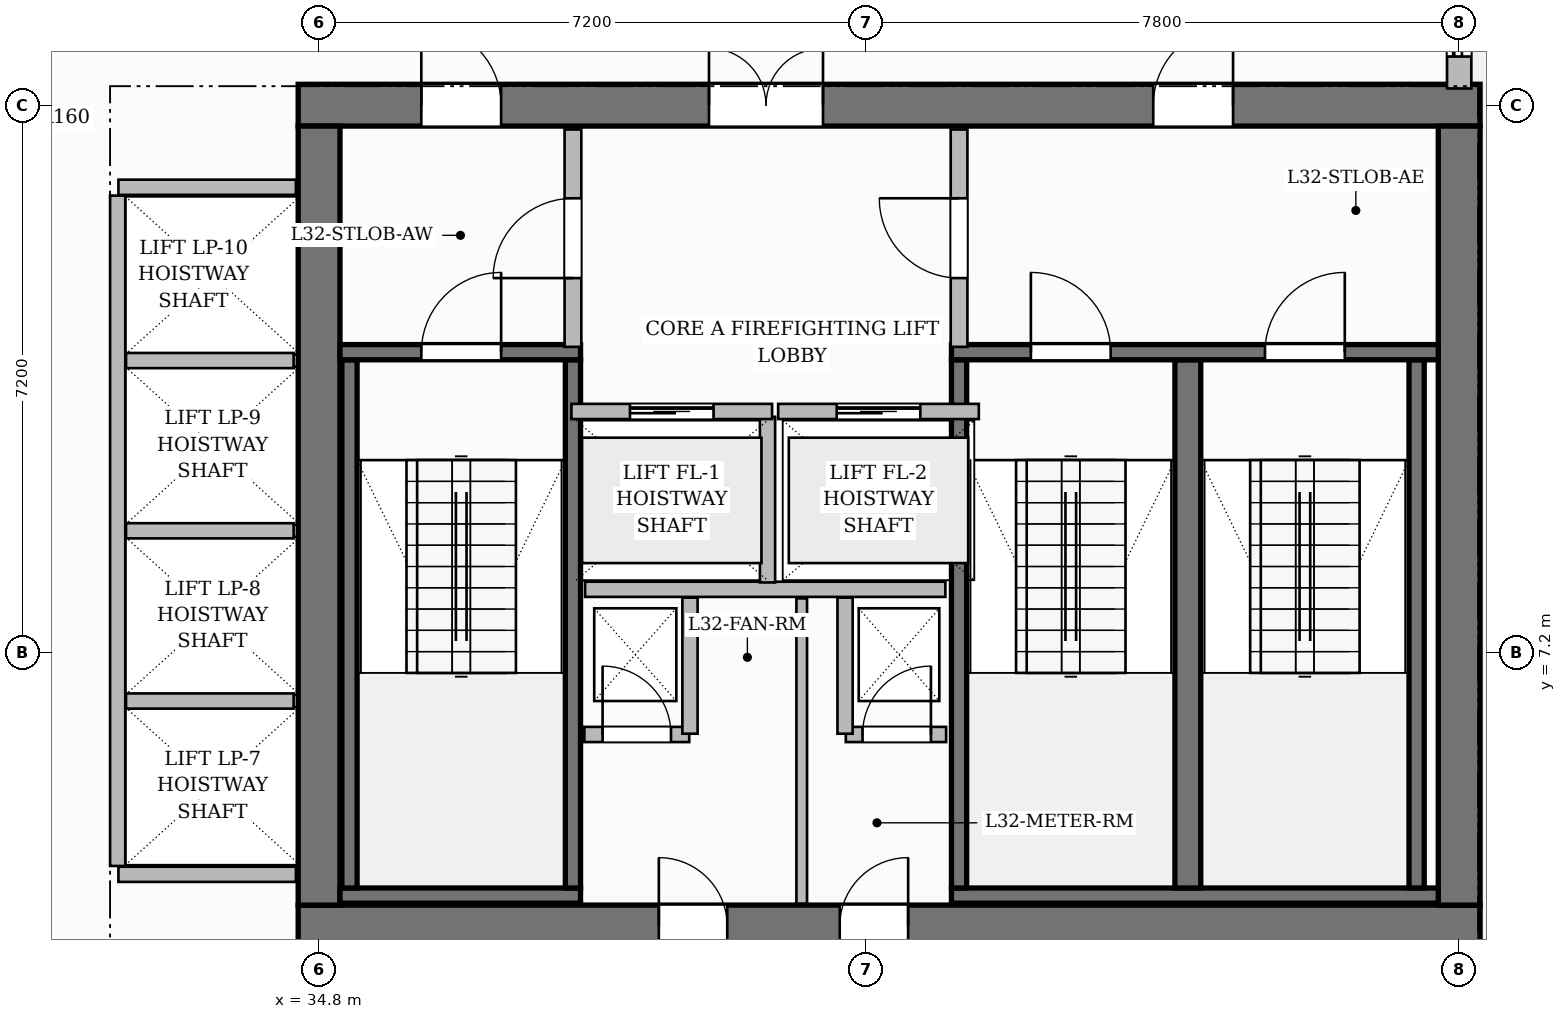
"""IFC4 building model, lengths in metres.
Left out: names, types, materials, properties, quantities, classifications, styles, units other than length and angle.
Written with IfcOpenShell. Run it as: python <this file> out.ifc"""

import sys

from ifc_helpers import new_model, si_unit, direction, frame, frame_2d, origin, place, context, subcontext, project, spatial, rectangle, extrude, source, transform, mapped, element, fill, save


model = new_model("IFC4")
c1 = context("Model", 3, precision=1e-05, world=origin(), true_north=direction((0.0, 1.0)))
c2 = subcontext(c1, "Body", "Model", "MODEL_VIEW")
j1 = project(units=[si_unit("LENGTHUNIT", "METRE"), si_unit("PLANEANGLEUNIT", "RADIAN")], contexts=[c1])
p1 = place(None, origin())
s1 = spatial("IfcSite", under=j1, at=p1, CompositionType="ELEMENT")
p2 = place(p1, origin())
s2 = spatial("IfcBuilding", under=s1, at=p2, CompositionType="ELEMENT")
p3 = place(p2, frame((0.0, 0.0, 130.3)))
s3 = spatial("IfcBuildingStorey", under=s2, at=p3, CompositionType="ELEMENT", Elevation=130.3)
p4 = place(p3, frame((34.525, 3.6, 0.0), z_axis=(0.0, 0.0, 1.0), x_axis=(1.0, 0.0, 0.0)))
e1 = element("IfcWall", 1, at=p4, inside=s3, PredefinedType="SHEAR", context=c2, shape_type="SweptSolid", body=[
    extrude(rectangle(XDim=15.55, YDim=0.55, at=frame_2d((7.775, 0.0))), origin(), (0.0, 0.0, 1.0), 3.7),
])
p5 = place(p4, frame((4.745, 0.0, 0.0)))
e2 = element("IfcOpeningElement", 2, at=p5, cuts=e1, PredefinedType="OPENING", context=c2, shape_type="SweptSolid", body=[
    extrude(rectangle(XDim=0.9, YDim=2.1, at=frame_2d((0.45, 1.05))), frame((0.0, 0.285, 0.0), z_axis=(0.0, -1.0, 0.0), x_axis=(1.0, 0.0, 0.0)), (0.0, 0.0, 1.0), 0.57),
])
p6 = place(p4, frame((7.125, 0.0, 0.0)))
e3 = element("IfcOpeningElement", 3, at=p6, cuts=e1, PredefinedType="OPENING", context=c2, shape_type="SweptSolid", body=[
    extrude(rectangle(XDim=0.9, YDim=2.1, at=frame_2d((0.45, 1.05))), frame((0.0, 0.285, 0.0), z_axis=(0.0, -1.0, 0.0), x_axis=(1.0, 0.0, 0.0)), (0.0, 0.0, 1.0), 0.57),
])
p7 = place(p3, frame((34.525, 14.4, 0.0), z_axis=(0.0, 0.0, 1.0), x_axis=(1.0, 0.0, 0.0)))
e4 = element("IfcWall", 4, at=p7, inside=s3, PredefinedType="SHEAR", context=c2, shape_type="SweptSolid", body=[
    extrude(rectangle(XDim=15.55, YDim=0.55, at=frame_2d((7.775, 0.0))), origin(), (0.0, 0.0, 1.0), 3.7),
])
p8 = place(p7, frame((5.405, 0.0, 0.0)))
e5 = element("IfcOpeningElement", 5, at=p8, cuts=e4, PredefinedType="OPENING", context=c2, shape_type="SweptSolid", body=[
    extrude(rectangle(XDim=1.5, YDim=2.2, at=frame_2d((0.75, 1.1))), frame((0.0, 0.285, 0.0), z_axis=(0.0, -1.0, 0.0), x_axis=(1.0, 0.0, 0.0)), (0.0, 0.0, 1.0), 0.57),
])
p9 = place(p7, frame((1.62, 0.0, 0.0)))
e6 = element("IfcOpeningElement", 6, at=p9, cuts=e4, PredefinedType="OPENING", context=c2, shape_type="SweptSolid", body=[
    extrude(rectangle(XDim=1.05, YDim=2.15, at=frame_2d((0.525, 1.075))), frame((0.0, 0.285, 0.0), z_axis=(0.0, -1.0, 0.0), x_axis=(1.0, 0.0, 0.0)), (0.0, 0.0, 1.0), 0.57),
])
p10 = place(p7, frame((11.25, 0.0, 0.0)))
e7 = element("IfcOpeningElement", 7, at=p10, cuts=e4, PredefinedType="OPENING", context=c2, shape_type="SweptSolid", body=[
    extrude(rectangle(XDim=1.05, YDim=2.15, at=frame_2d((0.525, 1.075))), frame((0.0, 0.285, 0.0), z_axis=(0.0, -1.0, 0.0), x_axis=(1.0, 0.0, 0.0)), (0.0, 0.0, 1.0), 0.57),
])
for number, where, z_axis, x_axis in (
    (8, (34.8, 3.875, 0.0), (0.0, 0.0, 1.0), (0.0, 1.0, 0.0)),
    (9, (49.8, 3.875, 0.0), (0.0, 0.0, 1.0), (0.0, 1.0, 0.0)),
):
    element("IfcWall", number, at=place(p3, frame(where, z_axis=z_axis, x_axis=x_axis)), inside=s3, PredefinedType="SHEAR", context=c2, shape_type="SweptSolid", body=[
        extrude(rectangle(XDim=10.25, YDim=0.55, at=frame_2d((5.125, 0.0))), origin(), (0.0, 0.0, 1.0), 3.7),
    ])
p11 = place(p3, frame((35.075, 4.0, 0.0), z_axis=(0.0, 0.0, 1.0), x_axis=(1.0, 0.0, 0.0)))
e10 = element("IfcWall", 10, at=p11, inside=s3, PredefinedType="SHEAR", context=c2, shape_type="SweptSolid", body=[
    extrude(rectangle(XDim=3.165, YDim=0.2, at=frame_2d((1.583, 0.0))), origin(), (0.0, 0.0, 1.0), 3.7),
])
for number, where, z_axis, x_axis in (
    (11, (35.2, 4.1, 0.0), (0.0, 0.0, 1.0), (0.0, 1.0, 0.0)),
    (12, (38.14, 4.1, 0.0), (0.0, 0.0, 1.0), (0.0, 1.0, 0.0)),
):
    element("IfcWall", number, at=place(p3, frame(where, z_axis=z_axis, x_axis=x_axis)), inside=s3, PredefinedType="SHEAR", context=c2, shape_type="SweptSolid", body=[
        extrude(rectangle(XDim=6.95, YDim=0.2, at=frame_2d((3.475, 0.0))), origin(), (0.0, 0.0, 1.0), 3.7),
    ])
p12 = place(p3, frame((35.075, 11.15, 0.0), z_axis=(0.0, 0.0, 1.0), x_axis=(1.0, 0.0, 0.0)))
e13 = element("IfcWall", 13, at=p12, inside=s3, PredefinedType="SHEAR", context=c2, shape_type="SweptSolid", body=[
    extrude(rectangle(XDim=3.165, YDim=0.2, at=frame_2d((1.583, 0.0))), origin(), (0.0, 0.0, 1.0), 3.7),
])
p13 = place(p12, frame((1.07, 0.0, 0.0)))
e14 = element("IfcOpeningElement", 14, at=p13, cuts=e13, PredefinedType="OPENING", context=c2, shape_type="SweptSolid", body=[
    extrude(rectangle(XDim=1.05, YDim=2.2, at=frame_2d((0.525, 1.1))), frame((0.0, 0.11, 0.0), z_axis=(0.0, -1.0, 0.0), x_axis=(1.0, 0.0, 0.0)), (0.0, 0.0, 1.0), 0.22),
])
p14 = place(p3, frame((43.12, 4.0, 0.0), z_axis=(0.0, 0.0, 1.0), x_axis=(1.0, 0.0, 0.0)))
e15 = element("IfcWall", 15, at=p14, inside=s3, PredefinedType="SHEAR", context=c2, shape_type="SweptSolid", body=[
    extrude(rectangle(XDim=6.405, YDim=0.2, at=frame_2d((3.202, 0.0))), origin(), (0.0, 0.0, 1.0), 3.7),
])
p15 = place(p3, frame((43.22, 4.1, 0.0), z_axis=(0.0, 0.0, 1.0), x_axis=(0.0, 1.0, 0.0)))
e16 = element("IfcWall", 16, at=p15, inside=s3, PredefinedType="SHEAR", context=c2, shape_type="SweptSolid", body=[
    extrude(rectangle(XDim=6.95, YDim=0.2, at=frame_2d((3.475, 0.0))), origin(), (0.0, 0.0, 1.0), 3.7),
])
p16 = place(p3, frame((46.23, 4.1, 0.0), z_axis=(0.0, 0.0, 1.0), x_axis=(0.0, 1.0, 0.0)))
e17 = element("IfcWall", 17, at=p16, inside=s3, PredefinedType="SHEAR", context=c2, shape_type="SweptSolid", body=[
    extrude(rectangle(XDim=6.95, YDim=0.34, at=frame_2d((3.475, 0.0))), origin(), (0.0, 0.0, 1.0), 3.7),
])
p17 = place(p3, frame((49.24, 4.1, 0.0), z_axis=(0.0, 0.0, 1.0), x_axis=(0.0, 1.0, 0.0)))
e18 = element("IfcWall", 18, at=p17, inside=s3, PredefinedType="SHEAR", context=c2, shape_type="SweptSolid", body=[
    extrude(rectangle(XDim=6.95, YDim=0.2, at=frame_2d((3.475, 0.0))), origin(), (0.0, 0.0, 1.0), 3.7),
])
p18 = place(p3, frame((43.12, 11.15, 0.0), z_axis=(0.0, 0.0, 1.0), x_axis=(1.0, 0.0, 0.0)))
e19 = element("IfcWall", 19, at=p18, inside=s3, PredefinedType="SHEAR", context=c2, shape_type="SweptSolid", body=[
    extrude(rectangle(XDim=6.405, YDim=0.2, at=frame_2d((3.202, 0.0))), origin(), (0.0, 0.0, 1.0), 3.7),
])
p19 = place(p18, frame((1.045, 0.0, 0.0)))
e20 = element("IfcOpeningElement", 20, at=p19, cuts=e19, PredefinedType="OPENING", context=c2, shape_type="SweptSolid", body=[
    extrude(rectangle(XDim=1.05, YDim=2.2, at=frame_2d((0.525, 1.1))), frame((0.0, 0.11, 0.0), z_axis=(0.0, -1.0, 0.0), x_axis=(1.0, 0.0, 0.0)), (0.0, 0.0, 1.0), 0.22),
])
p20 = place(p18, frame((4.125, 0.0, 0.0)))
e21 = element("IfcOpeningElement", 21, at=p20, cuts=e19, PredefinedType="OPENING", context=c2, shape_type="SweptSolid", body=[
    extrude(rectangle(XDim=1.05, YDim=2.2, at=frame_2d((0.525, 1.1))), frame((0.0, 0.11, 0.0), z_axis=(0.0, -1.0, 0.0), x_axis=(1.0, 0.0, 0.0)), (0.0, 0.0, 1.0), 0.22),
])
p21 = place(p3, frame((38.3, 8.03, 0.0), z_axis=(0.0, 0.0, 1.0), x_axis=(1.0, 0.0, 0.0)))
e22 = element("IfcWall", 22, at=p21, inside=s3, PredefinedType="PARTITIONING", context=c2, shape_type="SweptSolid", body=[
    extrude(rectangle(XDim=4.74, YDim=0.2, at=frame_2d((2.37, 0.0))), origin(), (0.0, 0.0, 1.0), 3.45),
])
p22 = place(p3, frame((40.7, 8.12, 0.0), z_axis=(0.0, 0.0, 1.0), x_axis=(0.0, 1.0, 0.0)))
e23 = element("IfcWall", 23, at=p22, inside=s3, PredefinedType="PARTITIONING", context=c2, shape_type="SweptSolid", body=[
    extrude(rectangle(XDim=2.18, YDim=0.2, at=frame_2d((1.09, 0.0))), origin(), (0.0, 0.0, 1.0), 3.45),
])
p23 = place(p3, frame((38.14, 11.22, 0.0), z_axis=(0.0, 0.0, 1.0), x_axis=(0.0, 1.0, 0.0)))
e24 = element("IfcWall", 24, at=p23, inside=s3, PredefinedType="PARTITIONING", context=c2, shape_type="SweptSolid", body=[
    extrude(rectangle(XDim=2.86, YDim=0.22, at=frame_2d((1.43, 0.0))), origin(), (0.0, 0.0, 1.0), 3.45),
])
p24 = place(p23, frame((0.905, 0.0, 0.0)))
e25 = element("IfcOpeningElement", 25, at=p24, cuts=e24, PredefinedType="OPENING", context=c2, shape_type="SweptSolid", body=[
    extrude(rectangle(XDim=1.05, YDim=2.15, at=frame_2d((0.525, 1.075))), frame((0.0, 0.12, 0.0), z_axis=(0.0, -1.0, 0.0), x_axis=(1.0, 0.0, 0.0)), (0.0, 0.0, 1.0), 0.24),
])
p25 = place(p3, frame((43.22, 11.22, 0.0), z_axis=(0.0, 0.0, 1.0), x_axis=(0.0, 1.0, 0.0)))
e26 = element("IfcWall", 26, at=p25, inside=s3, PredefinedType="PARTITIONING", context=c2, shape_type="SweptSolid", body=[
    extrude(rectangle(XDim=2.86, YDim=0.22, at=frame_2d((1.43, 0.0))), origin(), (0.0, 0.0, 1.0), 3.45),
])
p26 = place(p25, frame((0.905, 0.0, 0.0)))
e27 = element("IfcOpeningElement", 27, at=p26, cuts=e26, PredefinedType="OPENING", context=c2, shape_type="SweptSolid", body=[
    extrude(rectangle(XDim=1.05, YDim=2.15, at=frame_2d((0.525, 1.075))), frame((0.0, 0.12, 0.0), z_axis=(0.0, -1.0, 0.0), x_axis=(1.0, 0.0, 0.0)), (0.0, 0.0, 1.0), 0.24),
])
p27 = place(p3, frame((38.29, 6.12, 0.0), z_axis=(0.0, 0.0, 1.0), x_axis=(1.0, 0.0, 0.0)))
e28 = element("IfcWall", 28, at=p27, inside=s3, PredefinedType="PARTITIONING", context=c2, shape_type="SweptSolid", body=[
    extrude(rectangle(XDim=1.38, YDim=0.2, at=frame_2d((0.69, 0.0))), origin(), (0.0, 0.0, 1.0), 3.45),
])
p28 = place(p27, frame((0.24, 0.0, 0.0)))
e29 = element("IfcOpeningElement", 29, at=p28, cuts=e28, PredefinedType="OPENING", context=c2, shape_type="SweptSolid", body=[
    extrude(rectangle(XDim=0.9, YDim=2.1, at=frame_2d((0.45, 1.05))), frame((0.0, 0.11, 0.0), z_axis=(0.0, -1.0, 0.0), x_axis=(1.0, 0.0, 0.0)), (0.0, 0.0, 1.0), 0.22),
])
p29 = place(p3, frame((39.68, 6.13, 0.0), z_axis=(0.0, 0.0, 1.0), x_axis=(0.0, 1.0, 0.0)))
e30 = element("IfcWall", 30, at=p29, inside=s3, PredefinedType="PARTITIONING", context=c2, shape_type="SweptSolid", body=[
    extrude(rectangle(XDim=1.79, YDim=0.2, at=frame_2d((0.895, 0.0))), origin(), (0.0, 0.0, 1.0), 3.45),
])
p30 = place(p3, frame((41.73, 6.12, 0.0), z_axis=(0.0, 0.0, 1.0), x_axis=(1.0, 0.0, 0.0)))
e31 = element("IfcWall", 31, at=p30, inside=s3, PredefinedType="PARTITIONING", context=c2, shape_type="SweptSolid", body=[
    extrude(rectangle(XDim=1.32, YDim=0.2, at=frame_2d((0.66, 0.0))), origin(), (0.0, 0.0, 1.0), 3.45),
])
p31 = place(p30, frame((0.22, 0.0, 0.0)))
e32 = element("IfcOpeningElement", 32, at=p31, cuts=e31, PredefinedType="OPENING", context=c2, shape_type="SweptSolid", body=[
    extrude(rectangle(XDim=0.9, YDim=2.1, at=frame_2d((0.45, 1.05))), frame((0.0, 0.11, 0.0), z_axis=(0.0, -1.0, 0.0), x_axis=(1.0, 0.0, 0.0)), (0.0, 0.0, 1.0), 0.22),
])
p32 = place(p3, frame((41.72, 6.13, 0.0), z_axis=(0.0, 0.0, 1.0), x_axis=(0.0, 1.0, 0.0)))
e33 = element("IfcWall", 33, at=p32, inside=s3, PredefinedType="PARTITIONING", context=c2, shape_type="SweptSolid", body=[
    extrude(rectangle(XDim=1.79, YDim=0.2, at=frame_2d((0.895, 0.0))), origin(), (0.0, 0.0, 1.0), 3.45),
])
p33 = place(p3, frame((41.15, 3.895, 0.0), z_axis=(0.0, 0.0, 1.0), x_axis=(0.0, 1.0, 0.0)))
e34 = element("IfcWall", 34, at=p33, inside=s3, PredefinedType="PARTITIONING", context=c2, shape_type="SweptSolid", body=[
    extrude(rectangle(XDim=4.015, YDim=0.14, at=frame_2d((2.007, 0.0))), origin(), (0.0, 0.0, 1.0), 3.45),
])
for number, where, z_axis, x_axis in (
    (35, (32.16, 4.28, 0.0), (0.0, 0.0, 1.0), (1.0, 0.0, 0.0)),
    (36, (32.16, 13.32, 0.0), (0.0, 0.0, 1.0), (1.0, 0.0, 0.0)),
):
    element("IfcWall", number, at=place(p3, frame(where, z_axis=z_axis, x_axis=x_axis)), inside=s3, PredefinedType="PARTITIONING", context=c2, shape_type="SweptSolid", body=[
        extrude(rectangle(XDim=2.335, YDim=0.2, at=frame_2d((1.167, 0.0))), origin(), (0.0, 0.0, 1.0), 3.45),
    ])
p34 = place(p3, frame((32.15, 4.39, 0.0), z_axis=(0.0, 0.0, 1.0), x_axis=(0.0, 1.0, 0.0)))
e37 = element("IfcWall", 37, at=p34, inside=s3, PredefinedType="PARTITIONING", context=c2, shape_type="SweptSolid", body=[
    extrude(rectangle(XDim=8.82, YDim=0.2, at=frame_2d((4.41, 0.0))), origin(), (0.0, 0.0, 1.0), 3.45),
])
for number, where, z_axis, x_axis in (
    (38, (32.26, 6.56, 0.0), (0.0, 0.0, 1.0), (1.0, 0.0, 0.0)),
    (39, (32.26, 8.8, 0.0), (0.0, 0.0, 1.0), (1.0, 0.0, 0.0)),
    (40, (32.26, 11.04, 0.0), (0.0, 0.0, 1.0), (1.0, 0.0, 0.0)),
):
    element("IfcWall", number, at=place(p3, frame(where, z_axis=z_axis, x_axis=x_axis)), inside=s3, PredefinedType="PARTITIONING", context=c2, shape_type="SweptSolid", body=[
        extrude(rectangle(XDim=2.205, YDim=0.2, at=frame_2d((1.103, 0.0))), origin(), (0.0, 0.0, 1.0), 3.45),
    ])
p35 = place(p3, frame((38.12, 10.37, 0.0), z_axis=(0.0, 0.0, 1.0), x_axis=(1.0, 0.0, 0.0)))
e41 = element("IfcWall", 41, at=p35, inside=s3, PredefinedType="PARTITIONING", context=c2, shape_type="SweptSolid", body=[
    extrude(rectangle(XDim=2.64, YDim=0.2, at=frame_2d((1.32, 0.0))), origin(), (0.0, 0.0, 1.0), 3.45),
])
p36 = place(p35, frame((0.77, 0.0, 0.0)))
e42 = element("IfcOpeningElement", 42, at=p36, cuts=e41, PredefinedType="OPENING", context=c2, shape_type="SweptSolid", body=[
    extrude(rectangle(XDim=1.1, YDim=2.2, at=frame_2d((0.55, 1.1))), frame((0.0, 0.11, 0.0), z_axis=(0.0, -1.0, 0.0), x_axis=(1.0, 0.0, 0.0)), (0.0, 0.0, 1.0), 0.22),
])
p37 = place(p3, frame((40.84, 10.37, 0.0), z_axis=(0.0, 0.0, 1.0), x_axis=(1.0, 0.0, 0.0)))
e43 = element("IfcWall", 43, at=p37, inside=s3, PredefinedType="PARTITIONING", context=c2, shape_type="SweptSolid", body=[
    extrude(rectangle(XDim=2.64, YDim=0.2, at=frame_2d((1.32, 0.0))), origin(), (0.0, 0.0, 1.0), 3.45),
])
p38 = place(p37, frame((0.77, 0.0, 0.0)))
e44 = element("IfcOpeningElement", 44, at=p38, cuts=e43, PredefinedType="OPENING", context=c2, shape_type="SweptSolid", body=[
    extrude(rectangle(XDim=1.1, YDim=2.2, at=frame_2d((0.55, 1.1))), frame((0.0, 0.11, 0.0), z_axis=(0.0, -1.0, 0.0), x_axis=(1.0, 0.0, 0.0)), (0.0, 0.0, 1.0), 0.22),
])
p39 = place(p3, frame((49.8, 14.62, 0.0), z_axis=(0.0, 0.0, 1.0), x_axis=(0.0, 1.0, 0.0)))
e45 = element("IfcWall", 45, at=p39, inside=s3, PredefinedType="SOLIDWALL", context=c2, shape_type="SweptSolid", body=[
    extrude(rectangle(XDim=6.93, YDim=0.32, at=frame_2d((3.465, 0.0))), origin(), (0.0, 0.0, 1.0), 2.935),
])
p40 = place(p39, frame((0.42, 0.0, 0.0)))
e46 = element("IfcOpeningElement", 46, at=p40, cuts=e45, PredefinedType="OPENING", context=c2, shape_type="SweptSolid", body=[
    extrude(rectangle(XDim=1.2, YDim=2.2, at=frame_2d((0.6, 1.1))), frame((0.0, 0.17, 0.0), z_axis=(0.0, -1.0, 0.0), x_axis=(1.0, 0.0, 0.0)), (0.0, 0.0, 1.0), 0.34),
])
p41 = place(p39, frame((3.384, 0.0, 0.8)))
e47 = element("IfcOpeningElement", 47, at=p41, cuts=e45, PredefinedType="OPENING", context=c2, shape_type="SweptSolid", body=[
    extrude(rectangle(XDim=1.8, YDim=1.85, at=frame_2d((0.9, 0.925))), frame((0.0, 0.17, 0.0), z_axis=(0.0, -1.0, 0.0), x_axis=(1.0, 0.0, 0.0)), (0.0, 0.0, 1.0), 0.34),
])
m1 = source(origin(), c2, "Body", "SweptSolid", [
    extrude(rectangle(XDim=1.05, YDim=2.2, at=frame_2d((0.525, 1.1))), frame((0.0, 0.025, 0.0), z_axis=(0.0, -1.0, 0.0), x_axis=(1.0, 0.0, 0.0)), (0.0, 0.0, 1.0), 0.05),
])
p42 = place(p13, origin())
e48 = element("IfcDoor", 48, at=p42, inside=s3, OperationType="SINGLE_SWING_RIGHT", PredefinedType="DOOR", context=c2, shape_type="MappedRepresentation", body=[
    mapped(m1, transform((0.0, 0.0, 0.0), scale=1.0)),
])
fill(e14, e48)
p43 = place(p19, origin())
e49 = element("IfcDoor", 49, at=p43, inside=s3, OperationType="SINGLE_SWING_LEFT", PredefinedType="DOOR", context=c2, shape_type="MappedRepresentation", body=[
    mapped(m1, transform((0.0, 0.0, 0.0), scale=1.0)),
])
fill(e20, e49)
p44 = place(p20, origin())
e50 = element("IfcDoor", 50, at=p44, inside=s3, OperationType="SINGLE_SWING_RIGHT", PredefinedType="DOOR", context=c2, shape_type="MappedRepresentation", body=[
    mapped(m1, transform((0.0, 0.0, 0.0), scale=1.0)),
])
fill(e21, e50)
m2 = source(origin(), c2, "Body", "SweptSolid", [
    extrude(rectangle(XDim=1.05, YDim=2.15, at=frame_2d((0.525, 1.075))), frame((0.0, 0.025, 0.0), z_axis=(0.0, -1.0, 0.0), x_axis=(1.0, 0.0, 0.0)), (0.0, 0.0, 1.0), 0.05),
])
p45 = place(p24, origin())
e51 = element("IfcDoor", 51, at=p45, inside=s3, OperationType="SINGLE_SWING_LEFT", PredefinedType="DOOR", context=c2, shape_type="MappedRepresentation", body=[
    mapped(m2, transform((0.0, 0.0, 0.0), scale=1.0)),
])
fill(e25, e51)
p46 = place(p26, origin())
e52 = element("IfcDoor", 52, at=p46, inside=s3, OperationType="SINGLE_SWING_RIGHT", PredefinedType="DOOR", context=c2, shape_type="MappedRepresentation", body=[
    mapped(m2, transform((0.0, 0.0, 0.0), scale=1.0)),
])
fill(e27, e52)
m3 = source(origin(), c2, "Body", "SweptSolid", [
    extrude(rectangle(XDim=1.5, YDim=2.2, at=frame_2d((0.75, 1.1))), frame((0.0, 0.025, 0.0), z_axis=(0.0, -1.0, 0.0), x_axis=(1.0, 0.0, 0.0)), (0.0, 0.0, 1.0), 0.05),
])
p47 = place(p8, origin())
e53 = element("IfcDoor", 53, at=p47, inside=s3, OperationType="DOUBLE_DOOR_SINGLE_SWING", PredefinedType="DOOR", context=c2, shape_type="MappedRepresentation", body=[
    mapped(m3, transform((0.0, 0.0, 0.0), scale=1.0)),
])
fill(e5, e53)
p48 = place(p9, origin())
e54 = element("IfcDoor", 54, at=p48, inside=s3, OperationType="SINGLE_SWING_LEFT", PredefinedType="DOOR", context=c2, shape_type="MappedRepresentation", body=[
    mapped(m2, transform((0.0, 0.0, 0.0), scale=1.0)),
])
fill(e6, e54)
p49 = place(p10, origin())
e55 = element("IfcDoor", 55, at=p49, inside=s3, OperationType="SINGLE_SWING_RIGHT", PredefinedType="DOOR", context=c2, shape_type="MappedRepresentation", body=[
    mapped(m2, transform((0.0, 0.0, 0.0), scale=1.0)),
])
fill(e7, e55)
m4 = source(origin(), c2, "Body", "SweptSolid", [
    extrude(rectangle(XDim=0.9, YDim=2.1, at=frame_2d((0.45, 1.05))), frame((0.0, 0.025, 0.0), z_axis=(0.0, -1.0, 0.0), x_axis=(1.0, 0.0, 0.0)), (0.0, 0.0, 1.0), 0.05),
])
p50 = place(p28, origin())
e56 = element("IfcDoor", 56, at=p50, inside=s3, OperationType="SINGLE_SWING_LEFT", PredefinedType="DOOR", context=c2, shape_type="MappedRepresentation", body=[
    mapped(m4, transform((0.0, 0.0, 0.0), scale=1.0)),
])
fill(e29, e56)
p51 = place(p31, origin())
e57 = element("IfcDoor", 57, at=p51, inside=s3, OperationType="SINGLE_SWING_RIGHT", PredefinedType="DOOR", context=c2, shape_type="MappedRepresentation", body=[
    mapped(m4, transform((0.0, 0.0, 0.0), scale=1.0)),
])
fill(e32, e57)
p52 = place(p5, origin())
e58 = element("IfcDoor", 58, at=p52, inside=s3, OperationType="SINGLE_SWING_LEFT", PredefinedType="DOOR", context=c2, shape_type="MappedRepresentation", body=[
    mapped(m4, transform((0.0, 0.0, 0.0), scale=1.0)),
])
fill(e2, e58)
p53 = place(p6, origin())
e59 = element("IfcDoor", 59, at=p53, inside=s3, OperationType="SINGLE_SWING_RIGHT", PredefinedType="DOOR", context=c2, shape_type="MappedRepresentation", body=[
    mapped(m4, transform((0.0, 0.0, 0.0), scale=1.0)),
])
fill(e3, e59)
m5 = source(origin(), c2, "Body", "SweptSolid", [
    extrude(rectangle(XDim=1.1, YDim=2.2, at=frame_2d((0.55, 1.1))), frame((0.0, 0.025, 0.0), z_axis=(0.0, -1.0, 0.0), x_axis=(1.0, 0.0, 0.0)), (0.0, 0.0, 1.0), 0.05),
])
p54 = place(p36, origin())
e60 = element("IfcDoor", 60, at=p54, inside=s3, OperationType="SLIDING_TO_LEFT", PredefinedType="DOOR", context=c2, shape_type="MappedRepresentation", body=[
    mapped(m5, transform((0.0, 0.0, 0.0), scale=1.0)),
])
fill(e42, e60)
p55 = place(p38, origin())
e61 = element("IfcDoor", 61, at=p55, inside=s3, OperationType="SLIDING_TO_LEFT", PredefinedType="DOOR", context=c2, shape_type="MappedRepresentation", body=[
    mapped(m5, transform((0.0, 0.0, 0.0), scale=1.0)),
])
fill(e44, e61)
m6 = source(origin(), c2, "Body", "SweptSolid", [
    extrude(rectangle(XDim=1.2, YDim=2.2, at=frame_2d((0.6, 1.1))), frame((0.0, 0.025, 0.0), z_axis=(0.0, -1.0, 0.0), x_axis=(1.0, 0.0, 0.0)), (0.0, 0.0, 1.0), 0.05),
])
p56 = place(p40, origin())
e62 = element("IfcDoor", 62, at=p56, inside=s3, OperationType="SLIDING_TO_LEFT", PredefinedType="DOOR", context=c2, shape_type="MappedRepresentation", body=[
    mapped(m6, transform((0.0, 0.0, 0.0), scale=1.0)),
])
fill(e46, e62)
save(model, sys.argv[1])
